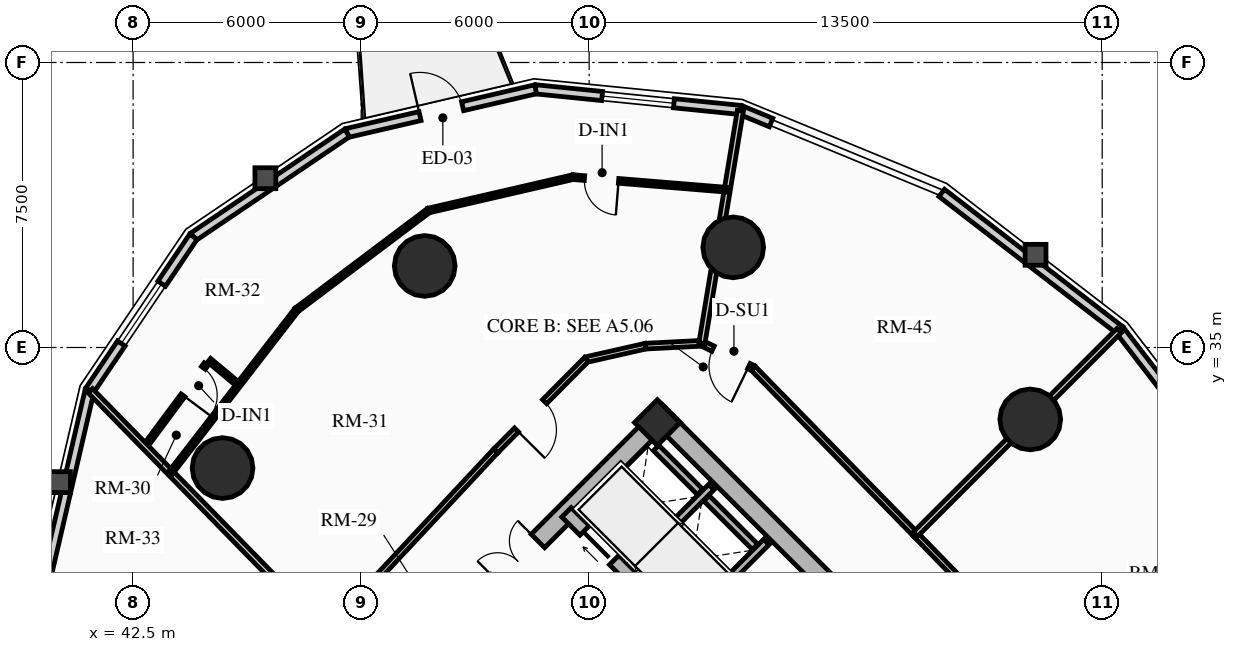
"""IFC4 building model, lengths in metres.
Left out: names, types, materials, properties, quantities, classifications, styles, units other than length and angle.
Written with IfcOpenShell. Run it as: python <this file> out.ifc"""

import sys

from ifc_helpers import new_model, si_unit, direction, frame, frame_2d, origin, origin_2d, place, context, subcontext, project, spatial, rectangle, circle, extrude, source, transform, mapped, element, fill, save


model = new_model("IFC4")
c1 = context("Model", 3, precision=1e-05, world=origin(), true_north=direction((0.0, 1.0)))
c2 = subcontext(c1, "Body", "Model", "MODEL_VIEW")
j1 = project(units=[si_unit("LENGTHUNIT", "METRE"), si_unit("PLANEANGLEUNIT", "RADIAN")], contexts=[c1])
p1 = place(None, origin())
s1 = spatial("IfcSite", under=j1, at=p1, CompositionType="ELEMENT")
p2 = place(p1, origin())
s2 = spatial("IfcBuilding", under=s1, at=p2, CompositionType="ELEMENT")
p3 = place(p2, frame((0.0, 0.0, 42.37)))
s3 = spatial("IfcBuildingStorey", under=s2, at=p3, CompositionType="ELEMENT", Elevation=42.37)
p4 = place(p3, frame((66.339, 23.227, 0.0), z_axis=(0.0, 0.0, 1.0), x_axis=(-0.707106781187, 0.707106781187, 0.0)))
e1 = element("IfcWall", 1, at=p4, inside=s3, PredefinedType="SHEAR", context=c2, shape_type="SweptSolid", body=[
    extrude(rectangle(XDim=14.3, YDim=0.5, at=frame_2d((7.15, 0.0))), origin(), (0.0, 0.0, 1.0), 2.91),
])
p5 = place(p3, frame((48.838, 25.596, 0.0), z_axis=(0.0, 0.0, 1.0), x_axis=(0.707106781187, 0.707106781187, 0.0)))
e2 = element("IfcWall", 2, at=p5, inside=s3, PredefinedType="SHEAR", context=c2, shape_type="SweptSolid", body=[
    extrude(rectangle(XDim=10.7, YDim=0.5, at=frame_2d((5.35, 0.0))), origin(), (0.0, 0.0, 1.0), 2.91),
])
m1 = source(origin(), c2, "Body", "SweptSolid", [
    extrude(rectangle(XDim=1.5, YDim=2.02, at=frame_2d((0.75, 1.01))), frame((0.0, 0.26, 0.0), z_axis=(0.0, -1.0, 0.0), x_axis=(1.0, 0.0, 0.0)), (0.0, 0.0, 1.0), 0.52),
])
p6 = place(p5, frame((4.6, 0.0, 0.0)))
e3 = element("IfcOpeningElement", 3, at=p6, cuts=e2, PredefinedType="OPENING", context=c2, shape_type="MappedRepresentation", body=[
    mapped(m1, transform((0.0, 0.0, 0.0), x_axis=(1.0, 0.0, 0.0), y_axis=(0.0, 1.0, 0.0), z_axis=(0.0, 0.0, 1.0), scale=1.0)),
])
p7 = place(p3, frame((63.662, 20.904, 0.0), z_axis=(0.0, 0.0, 1.0), x_axis=(-0.707106781187, 0.707106781187, 0.0)))
e4 = element("IfcWall", 4, at=p7, inside=s3, PredefinedType="SHEAR", context=c2, shape_type="SweptSolid", body=[
    extrude(rectangle(XDim=13.8, YDim=0.35, at=frame_2d((6.9, 0.0))), origin(), (0.0, 0.0, 1.0), 2.91),
])
m2 = source(origin(), c2, "Body", "SweptSolid", [
    extrude(rectangle(XDim=1.1, YDim=2.015, at=frame_2d((0.55, 1.007))), frame((0.0, 0.185, 0.0), z_axis=(0.0, -1.0, 0.0), x_axis=(1.0, 0.0, 0.0)), (0.0, 0.0, 1.0), 0.37),
])
p8 = place(p7, frame((10.025, 0.0, 0.0)))
e5 = element("IfcOpeningElement", 5, at=p8, cuts=e4, PredefinedType="OPENING", context=c2, shape_type="MappedRepresentation", body=[
    mapped(m2, transform((0.0, 0.0, 0.0), x_axis=(1.0, 0.0, 0.0), y_axis=(0.0, 1.0, 0.0), z_axis=(0.0, 0.0, 1.0), scale=1.0)),
])
p9 = place(p7, frame((12.025, 0.0, 0.0)))
e6 = element("IfcOpeningElement", 6, at=p9, cuts=e4, PredefinedType="OPENING", context=c2, shape_type="MappedRepresentation", body=[
    mapped(m2, transform((0.0, 0.0, 0.0), x_axis=(1.0, 0.0, 0.0), y_axis=(0.0, 1.0, 0.0), z_axis=(0.0, 0.0, 1.0), scale=1.0)),
])
m3 = source(origin(), c2, "Body", "SweptSolid", [
    extrude(rectangle(XDim=1.15, YDim=2.02, at=frame_2d((0.575, 1.01))), frame((0.0, 0.185, 0.0), z_axis=(0.0, -1.0, 0.0), x_axis=(1.0, 0.0, 0.0)), (0.0, 0.0, 1.0), 0.37),
])
p10 = place(p7, frame((5.33, 0.0, 0.0)))
e7 = element("IfcOpeningElement", 7, at=p10, cuts=e4, PredefinedType="OPENING", context=c2, shape_type="MappedRepresentation", body=[
    mapped(m3, transform((0.0, 0.0, 0.0), x_axis=(1.0, 0.0, 0.0), y_axis=(0.0, 1.0, 0.0), z_axis=(0.0, 0.0, 1.0), scale=1.0)),
])
p11 = place(p3, frame((56.294, 33.024, 0.0), z_axis=(0.0, 0.0, 1.0), x_axis=(0.707106781187, 0.707106781187, 0.0)))
e8 = element("IfcColumn", 8, at=p11, inside=s3, PredefinedType="COLUMN", context=c2, shape_type="SweptSolid", body=[
    extrude(rectangle(XDim=0.85, YDim=0.85, at=origin_2d()), origin(), (0.0, 0.0, 1.0), 2.91),
])
for number, where, z_axis, x_axis in (
    (9, (66.107, 33.107, 0.0), (0.0, 0.0, 1.0), (1.0, 0.0, 0.0)),
    (10, (58.291, 37.635, 0.0), (0.0, 0.0, 1.0), (1.0, 0.0, 0.0)),
    (11, (50.173, 37.146, 0.0), (0.0, 0.0, 1.0), (1.0, 0.0, 0.0)),
    (12, (44.854, 31.827, 0.0), (0.0, 0.0, 1.0), (1.0, 0.0, 0.0)),
):
    element("IfcColumn", number, at=place(p3, frame(where, z_axis=z_axis, x_axis=x_axis)), inside=s3, PredefinedType="USERDEFINED", context=c2, shape_type="SweptSolid", body=[
        extrude(circle(Radius=0.8, at=origin_2d()), origin(), (0.0, 0.0, 1.0), 2.91),
    ])
p12 = place(p3, frame((63.778, 39.068, 0.0), z_axis=(0.0, 0.0, 1.0), x_axis=(0.792020182601, -0.610494906082, 0.0)))
e13 = element("IfcWall", 13, at=p12, inside=s3, PredefinedType="SOLIDWALL", context=c2, shape_type="SweptSolid", body=[
    extrude(rectangle(XDim=5.911, YDim=0.24, at=frame_2d((2.956, 0.0))), origin(), (0.0, 0.0, 1.0), 2.073),
])
p13 = place(p3, frame((58.482, 41.251, 0.0), z_axis=(0.0, 0.0, 1.0), x_axis=(0.924556017656, -0.381046152345, 0.0)))
e14 = element("IfcWall", 14, at=p13, inside=s3, PredefinedType="SOLIDWALL", context=c2, shape_type="SweptSolid", body=[
    extrude(rectangle(XDim=0.87, YDim=0.24, at=frame_2d((0.435, 0.0))), origin(), (0.0, 0.0, 1.0), 2.073),
])
p14 = place(p3, frame((53.09, 41.794, 0.0), z_axis=(0.0, 0.0, 1.0), x_axis=(0.994968263437, -0.100190592135, 0.0)))
e15 = element("IfcWall", 15, at=p14, inside=s3, PredefinedType="SOLIDWALL", context=c2, shape_type="SweptSolid", body=[
    extrude(rectangle(XDim=5.419, YDim=0.24, at=frame_2d((2.71, 0.0))), origin(), (0.0, 0.0, 1.0), 2.073),
])
m4 = source(origin(), c2, "Body", "SweptSolid", [
    extrude(rectangle(XDim=1.9, YDim=1.35, at=frame_2d((0.95, 0.675))), frame((0.0, 0.13, 0.0), z_axis=(0.0, -1.0, 0.0), x_axis=(1.0, 0.0, 0.0)), (0.0, 0.0, 1.0), 0.26),
])
p15 = place(p14, frame((1.76, 0.0, 0.65)))
e16 = element("IfcOpeningElement", 16, at=p15, cuts=e15, PredefinedType="OPENING", context=c2, shape_type="MappedRepresentation", body=[
    mapped(m4, transform((0.0, 0.0, 0.0), x_axis=(1.0, 0.0, 0.0), y_axis=(0.0, 1.0, 0.0), z_axis=(0.0, 0.0, 1.0), scale=1.0)),
])
p16 = place(p3, frame((48.129, 40.644, 0.0), z_axis=(0.0, 0.0, 1.0), x_axis=(0.974167686491, 0.22582585901, 0.0)))
e17 = element("IfcWall", 17, at=p16, inside=s3, PredefinedType="SOLIDWALL", context=c2, shape_type="SweptSolid", body=[
    extrude(rectangle(XDim=5.092, YDim=0.24, at=frame_2d((2.546, 0.0))), origin(), (0.0, 0.0, 1.0), 2.073),
])
m5 = source(origin(), c2, "Body", "SweptSolid", [
    extrude(rectangle(XDim=1.15, YDim=2.005, at=frame_2d((0.575, 1.002))), frame((0.0, 0.13, 0.0), z_axis=(0.0, -1.0, 0.0), x_axis=(1.0, 0.0, 0.0)), (0.0, 0.0, 1.0), 0.26),
])
p17 = place(p16, frame((1.971, 0.0, 0.0)))
e18 = element("IfcOpeningElement", 18, at=p17, cuts=e17, PredefinedType="OPENING", context=c2, shape_type="MappedRepresentation", body=[
    mapped(m5, transform((0.0, 0.0, 0.0), x_axis=(1.0, 0.0, 0.0), y_axis=(0.0, 1.0, 0.0), z_axis=(0.0, 0.0, 1.0), scale=1.0)),
])
p18 = place(p3, frame((44.086, 37.914, 0.0), z_axis=(0.0, 0.0, 1.0), x_axis=(0.828748297084, 0.559621532896, 0.0)))
e19 = element("IfcWall", 19, at=p18, inside=s3, PredefinedType="SOLIDWALL", context=c2, shape_type="SweptSolid", body=[
    extrude(rectangle(XDim=4.879, YDim=0.24, at=frame_2d((2.439, 0.0))), origin(), (0.0, 0.0, 1.0), 2.073),
])
p19 = place(p3, frame((41.356, 33.871, 0.0), z_axis=(0.0, 0.0, 1.0), x_axis=(0.559621532896, 0.828748297084, 0.0)))
e20 = element("IfcWall", 20, at=p19, inside=s3, PredefinedType="SOLIDWALL", context=c2, shape_type="SweptSolid", body=[
    extrude(rectangle(XDim=4.879, YDim=0.24, at=frame_2d((2.439, 0.0))), origin(), (0.0, 0.0, 1.0), 2.073),
])
p20 = place(p19, frame((1.489, 0.0, 0.65)))
e21 = element("IfcOpeningElement", 21, at=p20, cuts=e20, PredefinedType="OPENING", context=c2, shape_type="MappedRepresentation", body=[
    mapped(m4, transform((0.0, 0.0, 0.0), x_axis=(1.0, 0.0, 0.0), y_axis=(0.0, 1.0, 0.0), z_axis=(0.0, 0.0, 1.0), scale=1.0)),
])
p21 = place(p3, frame((40.206, 28.91, 0.0), z_axis=(0.0, 0.0, 1.0), x_axis=(0.22582585901, 0.974167686491, 0.0)))
e22 = element("IfcWall", 22, at=p21, inside=s3, PredefinedType="SOLIDWALL", context=c2, shape_type="SweptSolid", body=[
    extrude(rectangle(XDim=5.092, YDim=0.24, at=frame_2d((2.546, 0.0))), origin(), (0.0, 0.0, 1.0), 2.073),
])
p22 = place(p3, frame((68.459, 35.459, 0.0), z_axis=(0.0, 0.0, 1.0), x_axis=(0.610494906082, -0.792020182601, 0.0)))
e23 = element("IfcWall", 23, at=p22, inside=s3, PredefinedType="SOLIDWALL", context=c2, shape_type="SweptSolid", body=[
    extrude(rectangle(XDim=5.911, YDim=0.24, at=frame_2d((2.956, 0.0))), origin(), (0.0, 0.0, 1.0), 2.073),
])
p23 = place(p22, frame((2.005, 0.0, 0.65)))
e24 = element("IfcOpeningElement", 24, at=p23, cuts=e23, PredefinedType="OPENING", context=c2, shape_type="MappedRepresentation", body=[
    mapped(m4, transform((0.0, 0.0, 0.0), x_axis=(1.0, 0.0, 0.0), y_axis=(0.0, 1.0, 0.0), z_axis=(0.0, 0.0, 1.0), scale=1.0)),
])
p24 = place(p3, frame((57.062, 27.781, 0.0), z_axis=(0.0, 0.0, 1.0), x_axis=(0.707106781187, 0.707106781187, 0.0)))
e25 = element("IfcWall", 25, at=p24, inside=s3, PredefinedType="SHEAR", context=c2, shape_type="SweptSolid", body=[
    extrude(rectangle(XDim=2.97, YDim=0.2, at=frame_2d((1.485, 0.0))), origin(), (0.0, 0.0, 1.0), 2.91),
])
p25 = place(p3, frame((55.615, 29.227, 0.0), z_axis=(0.0, 0.0, 1.0), x_axis=(0.707147878904, 0.70706568108, 0.0)))
e26 = element("IfcWall", 26, at=p25, inside=s3, PredefinedType="SHEAR", context=c2, shape_type="SweptSolid", body=[
    extrude(rectangle(XDim=2.97, YDim=0.2, at=frame_2d((1.485, 0.0))), origin(), (0.0, 0.0, 1.0), 2.91),
])
p26 = place(p3, frame((58.865, 29.754, 0.0), z_axis=(0.0, 0.0, 1.0), x_axis=(-0.707174411312, 0.707039144592, 0.0)))
e27 = element("IfcWall", 27, at=p26, inside=s3, PredefinedType="SHEAR", context=c2, shape_type="SweptSolid", body=[
    extrude(rectangle(XDim=1.805, YDim=0.2, at=frame_2d((0.902, 0.0))), origin(), (0.0, 0.0, 1.0), 2.91),
])
p27 = place(p3, frame((57.419, 31.2, 0.0), z_axis=(0.0, 0.0, 1.0), x_axis=(-0.707032117043, 0.707181437447, 0.0)))
e28 = element("IfcWall", 28, at=p27, inside=s3, PredefinedType="SHEAR", context=c2, shape_type="SweptSolid", body=[
    extrude(rectangle(XDim=1.635, YDim=0.2, at=frame_2d((0.817, 0.0))), origin(), (0.0, 0.0, 1.0), 2.91),
])
p28 = place(p3, frame((63.086, 30.086, 0.0), z_axis=(0.0, 0.0, 1.0), x_axis=(-0.699075897379, 0.715047473741, 0.0)))
e29 = element("IfcWall", 29, at=p28, inside=s3, PredefinedType="PARTITIONING", context=c2, shape_type="SweptSolid", body=[
    extrude(rectangle(XDim=6.114, YDim=0.15, at=frame_2d((3.057, 0.0))), origin(), (0.0, 0.0, 1.0), 2.159),
])
p29 = place(p3, frame((58.812, 34.458, 0.0), z_axis=(0.0, 0.0, 1.0), x_axis=(-0.899559490277, 0.436798264021, 0.0)))
e30 = element("IfcWall", 30, at=p29, inside=s3, PredefinedType="PARTITIONING", context=c2, shape_type="SweptSolid", body=[
    extrude(rectangle(XDim=1.495, YDim=0.15, at=frame_2d((0.748, 0.0))), origin(), (0.0, 0.0, 1.0), 2.205),
])
m6 = source(origin(), c2, "Body", "SweptSolid", [
    extrude(rectangle(XDim=1.05, YDim=2.015, at=frame_2d((0.525, 1.007))), frame((0.0, 0.085, 0.0), z_axis=(0.0, -1.0, 0.0), x_axis=(1.0, 0.0, 0.0)), (0.0, 0.0, 1.0), 0.17),
])
p30 = place(p29, frame((0.12, 0.0, 0.0)))
e31 = element("IfcOpeningElement", 31, at=p30, cuts=e30, PredefinedType="OPENING", context=c2, shape_type="MappedRepresentation", body=[
    mapped(m6, transform((0.0, 0.0, 0.0), x_axis=(1.0, 0.0, 0.0), y_axis=(0.0, 1.0, 0.0), z_axis=(0.0, 0.0, 1.0), scale=1.0)),
])
p31 = place(p3, frame((57.467, 35.111, 0.0), z_axis=(0.0, 0.0, 1.0), x_axis=(-0.998691757323, -0.051134859488, 0.0)))
e32 = element("IfcWall", 32, at=p31, inside=s3, PredefinedType="PARTITIONING", context=c2, shape_type="SweptSolid", body=[
    extrude(rectangle(XDim=1.485, YDim=0.15, at=frame_2d((0.742, 0.0))), origin(), (0.0, 0.0, 1.0), 2.159),
])
p32 = place(p3, frame((55.984, 35.035, 0.0), z_axis=(0.0, 0.0, 1.0), x_axis=(-0.975290305708, -0.22092718165, 0.0)))
e33 = element("IfcWall", 33, at=p32, inside=s3, PredefinedType="PARTITIONING", context=c2, shape_type="SweptSolid", body=[
    extrude(rectangle(XDim=1.597, YDim=0.15, at=frame_2d((0.798, 0.0))), origin(), (0.0, 0.0, 1.0), 2.205),
])
p33 = place(p3, frame((54.427, 34.683, 0.0), z_axis=(0.0, 0.0, 1.0), x_axis=(-0.704178989986, -0.710022499687, 0.0)))
e34 = element("IfcWall", 34, at=p33, inside=s3, PredefinedType="PARTITIONING", context=c2, shape_type="SweptSolid", body=[
    extrude(rectangle(XDim=3.384, YDim=0.15, at=frame_2d((1.692, 0.0))), origin(), (0.0, 0.0, 1.0), 2.159),
])
p34 = place(p33, frame((1.56, 0.0, 0.0)))
e35 = element("IfcOpeningElement", 35, at=p34, cuts=e34, PredefinedType="OPENING", context=c2, shape_type="MappedRepresentation", body=[
    mapped(m6, transform((0.0, 0.0, 0.0), x_axis=(1.0, 0.0, 0.0), y_axis=(0.0, 1.0, 0.0), z_axis=(0.0, 0.0, 1.0), scale=1.0)),
])
p35 = place(p3, frame((52.043, 32.28, 0.0), z_axis=(0.0, 0.0, 1.0), x_axis=(-0.682606081633, -0.730786519661, 0.0)))
e36 = element("IfcWall", 36, at=p35, inside=s3, PredefinedType="PARTITIONING", context=c2, shape_type="SweptSolid", body=[
    extrude(rectangle(XDim=6.527, YDim=0.15, at=frame_2d((3.263, 0.0))), origin(), (0.0, 0.0, 1.0), 2.159),
])
p36 = place(p3, frame((67.27, 25.78, 0.0), z_axis=(0.0, 0.0, 1.0), x_axis=(-0.696847842907, 0.717218992942, 0.0)))
e37 = element("IfcWall", 37, at=p36, inside=s3, PredefinedType="PARTITIONING", context=c2, shape_type="SweptSolid", body=[
    extrude(rectangle(XDim=6.004, YDim=0.15, at=frame_2d((3.002, 0.0))), origin(), (0.0, 0.0, 1.0), 2.635),
])
m7 = source(origin(), c2, "Body", "SweptSolid", [
    extrude(rectangle(XDim=1.0, YDim=2.015, at=frame_2d((0.5, 1.007))), frame((0.0, 0.085, 0.0), z_axis=(0.0, -1.0, 0.0), x_axis=(1.0, 0.0, 0.0)), (0.0, 0.0, 1.0), 0.17),
])
p37 = place(p36, frame((2.502, 0.0, 0.0)))
e38 = element("IfcOpeningElement", 38, at=p37, cuts=e37, PredefinedType="OPENING", context=c2, shape_type="MappedRepresentation", body=[
    mapped(m7, transform((0.0, 0.0, 0.0), x_axis=(1.0, 0.0, 0.0), y_axis=(0.0, 1.0, 0.0), z_axis=(0.0, 0.0, 1.0), scale=1.0)),
])
p38 = place(p3, frame((63.086, 30.086, 0.0), z_axis=(0.0, 0.0, 1.0), x_axis=(0.707106781187, 0.707106781187, 0.0)))
e39 = element("IfcWall", 39, at=p38, inside=s3, PredefinedType="PARTITIONING", context=c2, shape_type="SweptSolid", body=[
    extrude(rectangle(XDim=7.579, YDim=0.16, at=frame_2d((3.79, 0.0))), origin(), (0.0, 0.0, 1.0), 2.073),
])
p39 = place(p3, frame((57.467, 35.111, 0.0), z_axis=(0.0, 0.0, 1.0), x_axis=(0.163141505202, 0.986602680556, 0.0)))
e40 = element("IfcWall", 40, at=p39, inside=s3, PredefinedType="PARTITIONING", context=c2, shape_type="SweptSolid", body=[
    extrude(rectangle(XDim=6.203, YDim=0.16, at=frame_2d((3.102, 0.0))), origin(), (0.0, 0.0, 1.0), 2.073),
])
p40 = place(p3, frame((47.588, 27.51, 0.0), z_axis=(0.0, 0.0, 1.0), x_axis=(-0.699371977892, 0.714757886657, 0.0)))
e41 = element("IfcWall", 41, at=p40, inside=s3, PredefinedType="PARTITIONING", context=c2, shape_type="SweptSolid", body=[
    extrude(rectangle(XDim=8.886, YDim=0.16, at=frame_2d((4.443, 0.0))), origin(), (0.0, 0.0, 1.0), 2.073),
])
p41 = place(p3, frame((58.135, 39.15, 0.0), z_axis=(0.0, 0.0, 1.0), x_axis=(-0.996661360768, 0.081646383578, 0.0)))
e42 = element("IfcWall", 42, at=p41, inside=s3, PredefinedType="PARTITIONING", context=c2, shape_type="SweptSolid", body=[
    extrude(rectangle(XDim=4.073, YDim=0.125, at=frame_2d((2.036, 0.0))), origin(), (0.0, 0.0, 1.0), 2.635),
])
m8 = source(origin(), c2, "Body", "SweptSolid", [
    extrude(rectangle(XDim=0.9, YDim=2.005, at=frame_2d((0.45, 1.002))), frame((0.0, 0.073, 0.0), z_axis=(0.0, -1.0, 0.0), x_axis=(1.0, 0.0, 0.0)), (0.0, 0.0, 1.0), 0.145),
])
p42 = place(p41, frame((2.869, 0.0, 0.0)))
e43 = element("IfcOpeningElement", 43, at=p42, cuts=e42, PredefinedType="OPENING", context=c2, shape_type="MappedRepresentation", body=[
    mapped(m8, transform((0.0, 0.0, 0.0), x_axis=(1.0, 0.0, 0.0), y_axis=(0.0, 1.0, 0.0), z_axis=(0.0, 0.0, 1.0), scale=1.0)),
])
p43 = place(p3, frame((54.076, 39.483, 0.0), z_axis=(0.0, 0.0, 1.0), x_axis=(-0.974339463782, -0.225083560744, 0.0)))
e44 = element("IfcWall", 44, at=p43, inside=s3, PredefinedType="PARTITIONING", context=c2, shape_type="SweptSolid", body=[
    extrude(rectangle(XDim=3.899, YDim=0.125, at=frame_2d((1.95, 0.0))), origin(), (0.0, 0.0, 1.0), 2.205),
])
p44 = place(p3, frame((50.276, 38.605, 0.0), z_axis=(0.0, 0.0, 1.0), x_axis=(-0.798927876279, -0.60142684385, 0.0)))
e45 = element("IfcWall", 45, at=p44, inside=s3, PredefinedType="PARTITIONING", context=c2, shape_type="SweptSolid", body=[
    extrude(rectangle(XDim=4.35, YDim=0.125, at=frame_2d((2.175, 0.0))), origin(), (0.0, 0.0, 1.0), 2.159),
])
p45 = place(p3, frame((46.801, 35.989, 0.0), z_axis=(0.0, 0.0, 1.0), x_axis=(-0.611635984749, -0.791139319058, 0.0)))
e46 = element("IfcWall", 46, at=p45, inside=s3, PredefinedType="PARTITIONING", context=c2, shape_type="SweptSolid", body=[
    extrude(rectangle(XDim=5.419, YDim=0.125, at=frame_2d((2.709, 0.0))), origin(), (0.0, 0.0, 1.0), 2.159),
])
p46 = place(p3, frame((45.204, 34.078, 0.0), z_axis=(0.0, 0.0, 1.0), x_axis=(-0.768330339969, 0.640053504547, 0.0)))
e47 = element("IfcWall", 47, at=p46, inside=s3, PredefinedType="PARTITIONING", context=c2, shape_type="SweptSolid", body=[
    extrude(rectangle(XDim=0.917, YDim=0.125, at=frame_2d((0.458, 0.0))), origin(), (0.0, 0.0, 1.0), 2.635),
])
p47 = place(p3, frame((44.421, 34.56, 0.0), z_axis=(0.0, 0.0, 1.0), x_axis=(-0.596454407051, -0.802646958699, 0.0)))
e48 = element("IfcWall", 48, at=p47, inside=s3, PredefinedType="PARTITIONING", context=c2, shape_type="SweptSolid", body=[
    extrude(rectangle(XDim=2.516, YDim=0.125, at=frame_2d((1.258, 0.0))), origin(), (0.0, 0.0, 1.0), 2.159),
])
p48 = place(p47, frame((0.12, 0.0, 0.0)))
e49 = element("IfcOpeningElement", 49, at=p48, cuts=e48, PredefinedType="OPENING", context=c2, shape_type="MappedRepresentation", body=[
    mapped(m8, transform((0.0, 0.0, 0.0), x_axis=(1.0, 0.0, 0.0), y_axis=(0.0, 1.0, 0.0), z_axis=(0.0, 0.0, 1.0), scale=1.0)),
])
m9 = source(origin(), c2, "Body", "SweptSolid", [
    extrude(rectangle(XDim=1.9, YDim=1.35, at=frame_2d((0.95, 0.675))), frame((0.0, 0.03, 0.0), z_axis=(0.0, -1.0, 0.0), x_axis=(1.0, 0.0, 0.0)), (0.0, 0.0, 1.0), 0.06),
])
p49 = place(p15, origin())
e50 = element("IfcWindow", 50, at=p49, inside=s3, PartitioningType="DOUBLE_PANEL_VERTICAL", PredefinedType="WINDOW", context=c2, shape_type="MappedRepresentation", body=[
    mapped(m9, transform((0.0, 0.0, 0.0), x_axis=(1.0, 0.0, 0.0), y_axis=(0.0, 1.0, 0.0), z_axis=(0.0, 0.0, 1.0), scale=1.0)),
])
fill(e16, e50)
m10 = source(origin(), c2, "Body", "SweptSolid", [
    extrude(rectangle(XDim=1.15, YDim=2.005, at=frame_2d((0.575, 1.002))), frame((0.0, 0.025, 0.0), z_axis=(0.0, -1.0, 0.0), x_axis=(1.0, 0.0, 0.0)), (0.0, 0.0, 1.0), 0.05),
])
p50 = place(p17, origin())
e51 = element("IfcDoor", 51, at=p50, inside=s3, OperationType="SINGLE_SWING_LEFT", PredefinedType="DOOR", context=c2, shape_type="MappedRepresentation", body=[
    mapped(m10, transform((0.0, 0.0, 0.0), x_axis=(1.0, 0.0, 0.0), y_axis=(0.0, 1.0, 0.0), z_axis=(0.0, 0.0, 1.0), scale=1.0)),
])
fill(e18, e51)
p51 = place(p20, origin())
e52 = element("IfcWindow", 52, at=p51, inside=s3, PartitioningType="DOUBLE_PANEL_VERTICAL", PredefinedType="WINDOW", context=c2, shape_type="MappedRepresentation", body=[
    mapped(m9, transform((0.0, 0.0, 0.0), x_axis=(1.0, 0.0, 0.0), y_axis=(0.0, 1.0, 0.0), z_axis=(0.0, 0.0, 1.0), scale=1.0)),
])
fill(e21, e52)
m11 = source(origin(), c2, "Body", "SweptSolid", [
    extrude(rectangle(XDim=1.1, YDim=2.015, at=frame_2d((0.55, 1.007))), frame((0.0, 0.025, 0.0), z_axis=(0.0, -1.0, 0.0), x_axis=(1.0, 0.0, 0.0)), (0.0, 0.0, 1.0), 0.05),
])
p52 = place(p9, origin())
e53 = element("IfcDoor", 53, at=p52, inside=s3, OperationType="SLIDING_TO_RIGHT", PredefinedType="DOOR", context=c2, shape_type="MappedRepresentation", body=[
    mapped(m11, transform((0.0, 0.0, 0.0), x_axis=(1.0, 0.0, 0.0), y_axis=(0.0, 1.0, 0.0), z_axis=(0.0, 0.0, 1.0), scale=1.0)),
])
fill(e6, e53)
m12 = source(origin(), c2, "Body", "SweptSolid", [
    extrude(rectangle(XDim=1.5, YDim=2.02, at=frame_2d((0.75, 1.01))), frame((0.0, 0.025, 0.0), z_axis=(0.0, -1.0, 0.0), x_axis=(1.0, 0.0, 0.0)), (0.0, 0.0, 1.0), 0.05),
])
p53 = place(p6, origin())
e54 = element("IfcDoor", 54, at=p53, inside=s3, OperationType="DOUBLE_DOOR_SINGLE_SWING", PredefinedType="DOOR", context=c2, shape_type="MappedRepresentation", body=[
    mapped(m12, transform((0.0, 0.0, 0.0), x_axis=(1.0, 0.0, 0.0), y_axis=(0.0, 1.0, 0.0), z_axis=(0.0, 0.0, 1.0), scale=1.0)),
])
fill(e3, e54)
m13 = source(origin(), c2, "Body", "SweptSolid", [
    extrude(rectangle(XDim=1.05, YDim=2.015, at=frame_2d((0.525, 1.007))), frame((0.0, 0.025, 0.0), z_axis=(0.0, -1.0, 0.0), x_axis=(1.0, 0.0, 0.0)), (0.0, 0.0, 1.0), 0.05),
])
p54 = place(p34, origin())
e55 = element("IfcDoor", 55, at=p54, inside=s3, OperationType="SINGLE_SWING_RIGHT", PredefinedType="DOOR", context=c2, shape_type="MappedRepresentation", body=[
    mapped(m13, transform((0.0, 0.0, 0.0), x_axis=(1.0, 0.0, 0.0), y_axis=(0.0, 1.0, 0.0), z_axis=(0.0, 0.0, 1.0), scale=1.0)),
])
fill(e35, e55)
m14 = source(origin(), c2, "Body", "SweptSolid", [
    extrude(rectangle(XDim=0.9, YDim=2.005, at=frame_2d((0.45, 1.002))), frame((0.0, 0.025, 0.0), z_axis=(0.0, -1.0, 0.0), x_axis=(1.0, 0.0, 0.0)), (0.0, 0.0, 1.0), 0.05),
])
p55 = place(p42, origin())
e56 = element("IfcDoor", 56, at=p55, inside=s3, OperationType="SINGLE_SWING_LEFT", PredefinedType="DOOR", context=c2, shape_type="MappedRepresentation", body=[
    mapped(m14, transform((0.0, 0.0, 0.0), x_axis=(1.0, 0.0, 0.0), y_axis=(0.0, 1.0, 0.0), z_axis=(0.0, 0.0, 1.0), scale=1.0)),
])
fill(e43, e56)
p56 = place(p48, origin())
e57 = element("IfcDoor", 57, at=p56, inside=s3, OperationType="SINGLE_SWING_RIGHT", PredefinedType="DOOR", context=c2, shape_type="MappedRepresentation", body=[
    mapped(m14, transform((0.0, 0.0, 0.0), x_axis=(1.0, 0.0, 0.0), y_axis=(0.0, 1.0, 0.0), z_axis=(0.0, 0.0, 1.0), scale=1.0)),
])
fill(e49, e57)
p57 = place(p30, origin())
e58 = element("IfcDoor", 58, at=p57, inside=s3, OperationType="SINGLE_SWING_LEFT", PredefinedType="DOOR", context=c2, shape_type="MappedRepresentation", body=[
    mapped(m13, transform((0.0, 0.0, 0.0), x_axis=(1.0, 0.0, 0.0), y_axis=(0.0, 1.0, 0.0), z_axis=(0.0, 0.0, 1.0), scale=1.0)),
])
fill(e31, e58)
save(model, sys.argv[1])
